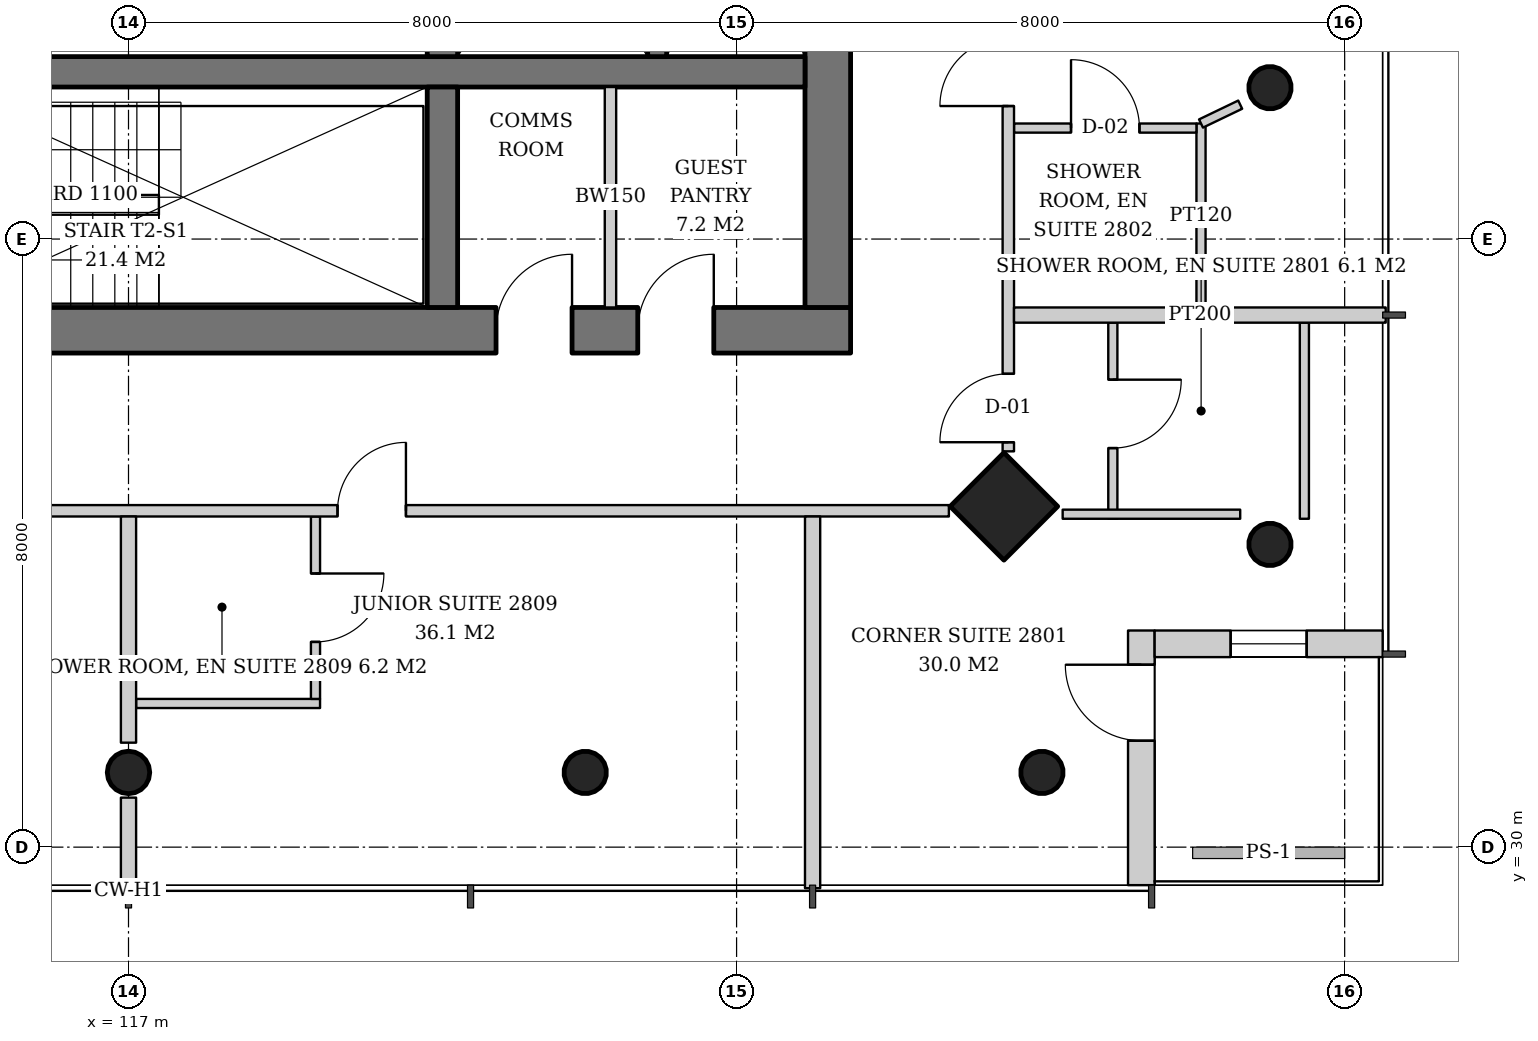
"""IFC4 building model, lengths in metres.
Left out: names, types, materials, properties, quantities, classifications, styles, units other than length and angle.
Written with IfcOpenShell. Run it as: python <this file> out.ifc"""

import sys

from ifc_helpers import new_model, si_unit, direction, frame, frame_2d, origin, origin_2d, place, context, subcontext, project, spatial, rectangle, hollow_circle, extrude, element, fill, save


model = new_model("IFC4")
c1 = context("Model", 3, precision=1e-05, world=origin(), true_north=direction((0.0, 1.0)))
c2 = subcontext(c1, "Body", "Model", "MODEL_VIEW")
j1 = project(units=[si_unit("LENGTHUNIT", "METRE"), si_unit("PLANEANGLEUNIT", "RADIAN")], contexts=[c1])
p1 = place(None, origin())
s1 = spatial("IfcSite", under=j1, at=p1, CompositionType="ELEMENT")
p2 = place(p1, origin())
s2 = spatial("IfcBuilding", under=s1, at=p2, CompositionType="ELEMENT")
p3 = place(p2, frame((0.0, 0.0, 112.2)))
s3 = spatial("IfcBuildingStorey", under=s2, at=p3, CompositionType="ELEMENT", Elevation=112.2)
p4 = place(p3, frame((132.069, 33.931, 0.0), z_axis=(-0.042965756413, 0.042965756413, 0.998152236661), x_axis=(-0.707106781187, -0.707106781187, 0.0)))
e1 = element("IfcColumn", 1, at=p4, inside=s3, PredefinedType="COLUMN", context=c2, shape_type="SweptSolid", body=[
    extrude(hollow_circle(Radius=0.28, WallThickness=0.02, at=origin_2d()), origin(), (0.0, 0.0, 1.0), 3.807),
])
p5 = place(p3, frame((132.069, 39.966, 0.0), z_axis=(-0.042995531285, 0.021497765643, 0.998843946952), x_axis=(-0.4472135955, -0.894427191, 0.0)))
e2 = element("IfcColumn", 2, at=p5, inside=s3, PredefinedType="COLUMN", context=c2, shape_type="SweptSolid", body=[
    extrude(hollow_circle(Radius=0.28, WallThickness=0.02, at=origin_2d()), origin(), (0.0, 0.0, 1.0), 3.804),
])
p6 = place(p3, frame((128.569, 34.431, 0.0), z_axis=(-0.042965756413, 0.042965756413, 0.998152236661), x_axis=(-0.707106781187, -0.707106781187, 0.0)))
e3 = element("IfcColumn", 3, at=p6, inside=s3, PredefinedType="COLUMN", context=c2, shape_type="SweptSolid", body=[
    extrude(rectangle(XDim=1.0, YDim=1.0, at=origin_2d()), origin(), (0.0, 0.0, 1.0), 3.807),
])
p7 = place(p3, frame((129.069, 30.931, 0.0), z_axis=(-0.042965756413, 0.042965756413, 0.998152236661), x_axis=(-0.707106781187, -0.707106781187, 0.0)))
e4 = element("IfcColumn", 4, at=p7, inside=s3, PredefinedType="COLUMN", context=c2, shape_type="SweptSolid", body=[
    extrude(hollow_circle(Radius=0.28, WallThickness=0.02, at=origin_2d()), origin(), (0.0, 0.0, 1.0), 3.807),
])
p8 = place(p3, frame((117.0, 30.931, 0.0), z_axis=(0.0, 0.043005470007, 0.999074836811), x_axis=(-1.0, 0.0, 0.0)))
e5 = element("IfcColumn", 5, at=p8, inside=s3, PredefinedType="COLUMN", context=c2, shape_type="SweptSolid", body=[
    extrude(hollow_circle(Radius=0.28, WallThickness=0.02, at=origin_2d()), origin(), (0.0, 0.0, 1.0), 3.803),
])
p9 = place(p3, frame((123.034, 30.931, 0.0), z_axis=(-0.021497765643, 0.042995531285, 0.998843946952), x_axis=(-0.894427191, -0.4472135955, 0.0)))
e6 = element("IfcColumn", 6, at=p9, inside=s3, PredefinedType="COLUMN", context=c2, shape_type="SweptSolid", body=[
    extrude(hollow_circle(Radius=0.28, WallThickness=0.02, at=origin_2d()), origin(), (0.0, 0.0, 1.0), 3.804),
])
p10 = place(p3, frame((107.5, 36.8, 0.0), z_axis=(0.0, 0.0, 1.0), x_axis=(1.0, 0.0, 0.0)))
e7 = element("IfcWall", 7, at=p10, inside=s3, PredefinedType="SHEAR", context=c2, shape_type="SweptSolid", body=[
    extrude(rectangle(XDim=19.0, YDim=0.6, at=frame_2d((9.5, 0.0))), origin(), (0.0, 0.0, 1.0), 3.8),
])
p11 = place(p10, frame((3.9, 0.0, 0.0)))
e8 = element("IfcOpeningElement", 8, at=p11, cuts=e7, PredefinedType="OPENING", context=c2, shape_type="SweptSolid", body=[
    extrude(rectangle(XDim=1.0, YDim=2.1, at=frame_2d((0.5, 1.05))), frame((0.0, 0.31, 0.0), z_axis=(0.0, -1.0, 0.0), x_axis=(1.0, 0.0, 0.0)), (0.0, 0.0, 1.0), 0.62),
])
p12 = place(p10, frame((14.335, 0.0, 0.0)))
e9 = element("IfcOpeningElement", 9, at=p12, cuts=e7, PredefinedType="OPENING", context=c2, shape_type="SweptSolid", body=[
    extrude(rectangle(XDim=1.0, YDim=2.1, at=frame_2d((0.5, 1.05))), frame((0.0, 0.31, 0.0), z_axis=(0.0, -1.0, 0.0), x_axis=(1.0, 0.0, 0.0)), (0.0, 0.0, 1.0), 0.62),
])
p13 = place(p10, frame((16.2, 0.0, 0.0)))
e10 = element("IfcOpeningElement", 10, at=p13, cuts=e7, PredefinedType="OPENING", context=c2, shape_type="SweptSolid", body=[
    extrude(rectangle(XDim=1.0, YDim=2.1, at=frame_2d((0.5, 1.05))), frame((0.0, 0.31, 0.0), z_axis=(0.0, -1.0, 0.0), x_axis=(1.0, 0.0, 0.0)), (0.0, 0.0, 1.0), 0.62),
])
p14 = place(p3, frame((126.2, 37.1, 0.0), z_axis=(0.0, 0.0, 1.0), x_axis=(0.0, 1.0, 0.0)))
e11 = element("IfcWall", 11, at=p14, inside=s3, PredefinedType="SHEAR", context=c2, shape_type="SweptSolid", body=[
    extrude(rectangle(XDim=17.8, YDim=0.6, at=frame_2d((8.9, 0.0))), origin(), (0.0, 0.0, 1.0), 3.8),
])
p15 = place(p14, frame((8.0, 0.0, 0.0)))
e12 = element("IfcOpeningElement", 12, at=p15, cuts=e11, PredefinedType="OPENING", context=c2, shape_type="SweptSolid", body=[
    extrude(rectangle(XDim=1.8, YDim=2.4, at=frame_2d((0.9, 1.2))), frame((0.0, 0.31, 0.0), z_axis=(0.0, -1.0, 0.0), x_axis=(1.0, 0.0, 0.0)), (0.0, 0.0, 1.0), 0.62),
])
p16 = place(p3, frame((108.1, 40.2, 0.0), z_axis=(0.0, 0.0, 1.0), x_axis=(1.0, 0.0, 0.0)))
e13 = element("IfcWall", 13, at=p16, inside=s3, PredefinedType="SHEAR", context=c2, shape_type="SweptSolid", body=[
    extrude(rectangle(XDim=17.8, YDim=0.4, at=frame_2d((8.9, 0.0))), origin(), (0.0, 0.0, 1.0), 3.8),
])
p17 = place(p3, frame((121.13, 37.1, 0.0), z_axis=(0.0, 0.0, 1.0), x_axis=(0.0, 1.0, 0.0)))
e14 = element("IfcWall", 14, at=p17, inside=s3, PredefinedType="SHEAR", context=c2, shape_type="SweptSolid", body=[
    extrude(rectangle(XDim=2.9, YDim=0.4, at=frame_2d((1.45, 0.0))), origin(), (0.0, 0.0, 1.0), 3.8),
])
p18 = place(p3, frame((121.13, 40.4, 0.0), z_axis=(0.0, 0.0, 1.0), x_axis=(0.0, 1.0, 0.0)))
e15 = element("IfcWall", 15, at=p18, inside=s3, PredefinedType="SHEAR", context=c2, shape_type="SweptSolid", body=[
    extrude(rectangle(XDim=11.2, YDim=0.4, at=frame_2d((5.6, 0.0))), origin(), (0.0, 0.0, 1.0), 3.8),
])
p19 = place(p3, frame((130.325, 29.5, 0.0), z_axis=(0.0, 0.0, 1.0), x_axis=(0.0, 1.0, 0.0)))
e16 = element("IfcWall", 16, at=p19, inside=s3, PredefinedType="SOLIDWALL", context=c2, shape_type="SweptSolid", body=[
    extrude(rectangle(XDim=3.35, YDim=0.35, at=frame_2d((1.675, 0.0))), origin(), (0.0, 0.0, 1.0), 3.6),
])
p20 = place(p19, frame((1.9, 0.0, 0.0)))
e17 = element("IfcOpeningElement", 17, at=p20, cuts=e16, PredefinedType="OPENING", context=c2, shape_type="SweptSolid", body=[
    extrude(rectangle(XDim=1.0, YDim=2.4, at=frame_2d((0.5, 1.2))), frame((0.0, 0.185, 0.0), z_axis=(0.0, -1.0, 0.0), x_axis=(1.0, 0.0, 0.0)), (0.0, 0.0, 1.0), 0.37),
])
p21 = place(p3, frame((130.5, 32.675, 0.0), z_axis=(0.0, 0.0, 1.0), x_axis=(1.0, 0.0, 0.0)))
e18 = element("IfcWall", 18, at=p21, inside=s3, PredefinedType="SOLIDWALL", context=c2, shape_type="SweptSolid", body=[
    extrude(rectangle(XDim=3.0, YDim=0.35, at=frame_2d((1.5, 0.0))), origin(), (0.0, 0.0, 1.0), 3.6),
])
p22 = place(p21, frame((1.0, 0.0, 0.9)))
e19 = element("IfcOpeningElement", 19, at=p22, cuts=e18, PredefinedType="OPENING", context=c2, shape_type="SweptSolid", body=[
    extrude(rectangle(XDim=1.0, YDim=2.4, at=frame_2d((0.5, 1.2))), frame((0.0, 0.185, 0.0), z_axis=(0.0, -1.0, 0.0), x_axis=(1.0, 0.0, 0.0)), (0.0, 0.0, 1.0), 0.37),
])
p23 = place(p3, frame((123.955, 44.25, 0.0), z_axis=(0.0, 0.0, 1.0), x_axis=(0.0, -1.0, 0.0)))
e20 = element("IfcWall", 20, at=p23, inside=s3, PredefinedType="SHEAR", context=c2, shape_type="SweptSolid", body=[
    extrude(rectangle(XDim=3.85, YDim=0.25, at=frame_2d((1.925, 0.0))), origin(), (0.0, 0.0, 1.0), 3.8),
])
p24 = place(p3, frame((123.341, 37.1, 0.0), z_axis=(0.0, 0.0, 1.0), x_axis=(0.0, 1.0, 0.0)))
e21 = element("IfcWall", 21, at=p24, inside=s3, PredefinedType="SOLIDWALL", context=c2, shape_type="SweptSolid", body=[
    extrude(rectangle(XDim=2.9, YDim=0.15, at=frame_2d((1.45, 0.0))), origin(), (0.0, 0.0, 1.0), 3.6),
])
p25 = place(p3, frame((129.95, 36.9, 0.0), z_axis=(0.0, 0.0, 1.0), x_axis=(0.0, -1.0, 0.0)))
e22 = element("IfcWall", 22, at=p25, inside=s3, PredefinedType="PARTITIONING", context=c2, shape_type="SweptSolid", body=[
    extrude(rectangle(XDim=2.58, YDim=0.12, at=frame_2d((1.29, 0.0))), origin(), (0.0, 0.0, 1.0), 2.9),
])
p26 = place(p25, frame((0.75, 0.0, 0.0)))
e23 = element("IfcOpeningElement", 23, at=p26, cuts=e22, PredefinedType="OPENING", context=c2, shape_type="SweptSolid", body=[
    extrude(rectangle(XDim=0.9, YDim=2.1, at=frame_2d((0.45, 1.05))), frame((0.0, 0.07, 0.0), z_axis=(0.0, -1.0, 0.0), x_axis=(1.0, 0.0, 0.0)), (0.0, 0.0, 1.0), 0.14),
])
p27 = place(p3, frame((132.47, 36.9, 0.0), z_axis=(0.0, 0.0, 1.0), x_axis=(0.0, -1.0, 0.0)))
e24 = element("IfcWall", 24, at=p27, inside=s3, PredefinedType="PARTITIONING", context=c2, shape_type="SweptSolid", body=[
    extrude(rectangle(XDim=2.58, YDim=0.12, at=frame_2d((1.29, 0.0))), origin(), (0.0, 0.0, 1.0), 3.6),
])
p28 = place(p3, frame((129.29, 34.38, 0.0), z_axis=(0.0, 0.0, 1.0), x_axis=(1.0, 0.0, 0.0)))
e25 = element("IfcWall", 25, at=p28, inside=s3, PredefinedType="PARTITIONING", context=c2, shape_type="SweptSolid", body=[
    extrude(rectangle(XDim=2.336, YDim=0.12, at=frame_2d((1.168, 0.0))), origin(), (0.0, 0.0, 1.0), 3.2),
])
p29 = place(p3, frame((131.11, 37.1, 0.0), z_axis=(0.0, 0.0, 1.0), x_axis=(0.0, 1.0, 0.0)))
e26 = element("IfcWall", 26, at=p29, inside=s3, PredefinedType="PARTITIONING", context=c2, shape_type="SweptSolid", body=[
    extrude(rectangle(XDim=2.42, YDim=0.12, at=frame_2d((1.21, 0.0))), origin(), (0.0, 0.0, 1.0), 3.6),
])
p30 = place(p3, frame((128.65, 39.46, 0.0), z_axis=(0.0, 0.0, 1.0), x_axis=(1.0, 0.0, 0.0)))
e27 = element("IfcWall", 27, at=p30, inside=s3, PredefinedType="PARTITIONING", context=c2, shape_type="SweptSolid", body=[
    extrude(rectangle(XDim=2.4, YDim=0.12, at=frame_2d((1.2, 0.0))), origin(), (0.0, 0.0, 1.0), 3.6),
])
p31 = place(p30, frame((0.75, 0.0, 0.0)))
e28 = element("IfcOpeningElement", 28, at=p31, cuts=e27, PredefinedType="OPENING", context=c2, shape_type="SweptSolid", body=[
    extrude(rectangle(XDim=0.9, YDim=2.1, at=frame_2d((0.45, 1.05))), frame((0.0, 0.07, 0.0), z_axis=(0.0, -1.0, 0.0), x_axis=(1.0, 0.0, 0.0)), (0.0, 0.0, 1.0), 0.14),
])
p32 = place(p3, frame((128.575, 35.207, 0.0), z_axis=(0.0, 0.0, 1.0), x_axis=(0.0, 1.0, 0.0)))
e29 = element("IfcWall", 29, at=p32, inside=s3, PredefinedType="PARTITIONING", context=c2, shape_type="SweptSolid", body=[
    extrude(rectangle(XDim=21.586, YDim=0.15, at=frame_2d((10.793, 0.0))), origin(), (0.0, 0.0, 1.0), 2.9),
])
p33 = place(p32, frame((0.12, 0.0, 0.0)))
e30 = element("IfcOpeningElement", 30, at=p33, cuts=e29, PredefinedType="OPENING", context=c2, shape_type="SweptSolid", body=[
    extrude(rectangle(XDim=0.9, YDim=2.1, at=frame_2d((0.45, 1.05))), frame((0.0, 0.085, 0.0), z_axis=(0.0, -1.0, 0.0), x_axis=(1.0, 0.0, 0.0)), (0.0, 0.0, 1.0), 0.17),
])
p34 = place(p32, frame((4.543, 0.0, 0.0)))
e31 = element("IfcOpeningElement", 31, at=p34, cuts=e29, PredefinedType="OPENING", context=c2, shape_type="SweptSolid", body=[
    extrude(rectangle(XDim=0.9, YDim=2.1, at=frame_2d((0.45, 1.05))), frame((0.0, 0.085, 0.0), z_axis=(0.0, -1.0, 0.0), x_axis=(1.0, 0.0, 0.0)), (0.0, 0.0, 1.0), 0.17),
])
p35 = place(p32, frame((13.543, 0.0, 0.0)))
e32 = element("IfcOpeningElement", 32, at=p35, cuts=e29, PredefinedType="OPENING", context=c2, shape_type="SweptSolid", body=[
    extrude(rectangle(XDim=0.9, YDim=2.1, at=frame_2d((0.45, 1.05))), frame((0.0, 0.085, 0.0), z_axis=(0.0, -1.0, 0.0), x_axis=(1.0, 0.0, 0.0)), (0.0, 0.0, 1.0), 0.17),
])
p36 = place(p3, frame((128.65, 37.0, 0.0), z_axis=(0.0, 0.0, 1.0), x_axis=(1.0, 0.0, 0.0)))
e33 = element("IfcWall", 33, at=p36, inside=s3, PredefinedType="PARTITIONING", context=c2, shape_type="SweptSolid", body=[
    extrude(rectangle(XDim=4.89, YDim=0.2, at=frame_2d((2.445, 0.0))), origin(), (0.0, 0.0, 1.0), 2.9),
])
p37 = place(p3, frame((117.1, 31.89, 0.0), z_axis=(0.0, 0.0, 1.0), x_axis=(1.0, 0.0, 0.0)))
e34 = element("IfcWall", 34, at=p37, inside=s3, PredefinedType="PARTITIONING", context=c2, shape_type="SweptSolid", body=[
    extrude(rectangle(XDim=2.42, YDim=0.12, at=frame_2d((1.21, 0.0))), origin(), (0.0, 0.0, 1.0), 3.6),
])
p38 = place(p3, frame((119.46, 34.35, 0.0), z_axis=(0.0, 0.0, 1.0), x_axis=(0.0, -1.0, 0.0)))
e35 = element("IfcWall", 35, at=p38, inside=s3, PredefinedType="PARTITIONING", context=c2, shape_type="SweptSolid", body=[
    extrude(rectangle(XDim=2.4, YDim=0.12, at=frame_2d((1.2, 0.0))), origin(), (0.0, 0.0, 1.0), 3.6),
])
p39 = place(p38, frame((0.75, 0.0, 0.0)))
e36 = element("IfcOpeningElement", 36, at=p39, cuts=e35, PredefinedType="OPENING", context=c2, shape_type="SweptSolid", body=[
    extrude(rectangle(XDim=0.9, YDim=2.1, at=frame_2d((0.45, 1.05))), frame((0.0, 0.07, 0.0), z_axis=(0.0, -1.0, 0.0), x_axis=(1.0, 0.0, 0.0)), (0.0, 0.0, 1.0), 0.14),
])
p40 = place(p3, frame((106.207, 34.425, 0.0), z_axis=(0.0, 0.0, 1.0), x_axis=(1.0, 0.0, 0.0)))
e37 = element("IfcWall", 37, at=p40, inside=s3, PredefinedType="PARTITIONING", context=c2, shape_type="SweptSolid", body=[
    extrude(rectangle(XDim=21.586, YDim=0.15, at=frame_2d((10.793, 0.0))), origin(), (0.0, 0.0, 1.0), 2.9),
])
p41 = place(p40, frame((0.12, 0.0, 0.0)))
e38 = element("IfcOpeningElement", 38, at=p41, cuts=e37, PredefinedType="OPENING", context=c2, shape_type="SweptSolid", body=[
    extrude(rectangle(XDim=0.9, YDim=2.1, at=frame_2d((0.45, 1.05))), frame((0.0, 0.085, 0.0), z_axis=(0.0, -1.0, 0.0), x_axis=(1.0, 0.0, 0.0)), (0.0, 0.0, 1.0), 0.17),
])
p42 = place(p40, frame((4.493, 0.0, 0.0)))
e39 = element("IfcOpeningElement", 39, at=p42, cuts=e37, PredefinedType="OPENING", context=c2, shape_type="SweptSolid", body=[
    extrude(rectangle(XDim=1.0, YDim=2.1, at=frame_2d((0.5, 1.05))), frame((0.0, 0.085, 0.0), z_axis=(0.0, -1.0, 0.0), x_axis=(1.0, 0.0, 0.0)), (0.0, 0.0, 1.0), 0.17),
])
p43 = place(p40, frame((13.543, 0.0, 0.0)))
e40 = element("IfcOpeningElement", 40, at=p43, cuts=e37, PredefinedType="OPENING", context=c2, shape_type="SweptSolid", body=[
    extrude(rectangle(XDim=0.9, YDim=2.1, at=frame_2d((0.45, 1.05))), frame((0.0, 0.085, 0.0), z_axis=(0.0, -1.0, 0.0), x_axis=(1.0, 0.0, 0.0)), (0.0, 0.0, 1.0), 0.17),
])
p44 = place(p3, frame((117.0, 34.35, 0.0), z_axis=(0.0, 0.0, 1.0), x_axis=(0.0, -1.0, 0.0)))
e41 = element("IfcWall", 41, at=p44, inside=s3, PredefinedType="PARTITIONING", context=c2, shape_type="SweptSolid", body=[
    extrude(rectangle(XDim=2.976, YDim=0.2, at=frame_2d((1.488, 0.0))), origin(), (0.0, 0.0, 1.0), 3.6),
])
p45 = place(p3, frame((117.0, 30.652, 0.0), z_axis=(0.0, 0.0, 1.0), x_axis=(0.0, -1.0, 0.0)))
e42 = element("IfcWall", 42, at=p45, inside=s3, PredefinedType="PARTITIONING", context=c2, shape_type="SweptSolid", body=[
    extrude(rectangle(XDim=1.192, YDim=0.2, at=frame_2d((0.596, 0.0))), origin(), (0.0, 0.0, 1.0), 3.6),
])
p46 = place(p3, frame((126.0, 34.35, 0.0), z_axis=(0.0, 0.0, 1.0), x_axis=(0.0, -1.0, 0.0)))
e43 = element("IfcWall", 43, at=p46, inside=s3, PredefinedType="PARTITIONING", context=c2, shape_type="SweptSolid", body=[
    extrude(rectangle(XDim=4.89, YDim=0.2, at=frame_2d((2.445, 0.0))), origin(), (0.0, 0.0, 1.0), 3.2),
])
p47 = place(p3, frame((131.11, 39.52, 0.0), z_axis=(0.0, 0.0, 1.0), x_axis=(0.901316511947, 0.433161107778, 0.0)))
e44 = element("IfcWall", 44, at=p47, inside=s3, PredefinedType="PARTITIONING", context=c2, shape_type="SweptSolid", body=[
    extrude(rectangle(XDim=0.572, YDim=0.12, at=frame_2d((0.286, 0.0))), origin(), (0.0, 0.0, 1.0), 3.6),
])
p48 = place(p20, origin())
e45 = element("IfcDoor", 45, at=p48, inside=s3, OperationType="SINGLE_SWING_RIGHT", PredefinedType="DOOR", context=c2, shape_type="SweptSolid", body=[
    extrude(rectangle(XDim=1.0, YDim=2.4, at=frame_2d((0.5, 1.2))), frame((0.0, 0.025, 0.0), z_axis=(0.0, -1.0, 0.0), x_axis=(1.0, 0.0, 0.0)), (0.0, 0.0, 1.0), 0.05),
])
fill(e17, e45)
p49 = place(p22, origin())
e46 = element("IfcWindow", 46, at=p49, inside=s3, PartitioningType="SINGLE_PANEL", PredefinedType="WINDOW", context=c2, shape_type="SweptSolid", body=[
    extrude(rectangle(XDim=1.0, YDim=2.4, at=frame_2d((0.5, 1.2))), frame((0.0, 0.03, 0.0), z_axis=(0.0, -1.0, 0.0), x_axis=(1.0, 0.0, 0.0)), (0.0, 0.0, 1.0), 0.06),
])
fill(e19, e46)
p50 = place(p12, origin())
e47 = element("IfcDoor", 47, at=p50, inside=s3, OperationType="SINGLE_SWING_RIGHT", PredefinedType="DOOR", context=c2, shape_type="SweptSolid", body=[
    extrude(rectangle(XDim=1.0, YDim=2.1, at=frame_2d((0.5, 1.05))), frame((0.0, 0.29, 0.0), z_axis=(0.0, -1.0, 0.0), x_axis=(1.0, 0.0, 0.0)), (0.0, 0.0, 1.0), 0.05),
])
fill(e9, e47)
p51 = place(p13, origin())
e48 = element("IfcDoor", 48, at=p51, inside=s3, OperationType="SINGLE_SWING_RIGHT", PredefinedType="DOOR", context=c2, shape_type="SweptSolid", body=[
    extrude(rectangle(XDim=1.0, YDim=2.1, at=frame_2d((0.5, 1.05))), frame((0.0, 0.29, 0.0), z_axis=(0.0, -1.0, 0.0), x_axis=(1.0, 0.0, 0.0)), (0.0, 0.0, 1.0), 0.05),
])
fill(e10, e48)
p52 = place(p26, origin())
e49 = element("IfcDoor", 49, at=p52, inside=s3, OperationType="SINGLE_SWING_LEFT", PredefinedType="DOOR", context=c2, shape_type="SweptSolid", body=[
    extrude(rectangle(XDim=0.9, YDim=2.1, at=frame_2d((0.45, 1.05))), frame((0.0, 0.025, 0.0), z_axis=(0.0, -1.0, 0.0), x_axis=(1.0, 0.0, 0.0)), (0.0, 0.0, 1.0), 0.05),
])
fill(e23, e49)
p53 = place(p31, origin())
e50 = element("IfcDoor", 50, at=p53, inside=s3, OperationType="SINGLE_SWING_LEFT", PredefinedType="DOOR", context=c2, shape_type="SweptSolid", body=[
    extrude(rectangle(XDim=0.9, YDim=2.1, at=frame_2d((0.45, 1.05))), frame((0.0, 0.025, 0.0), z_axis=(0.0, -1.0, 0.0), x_axis=(1.0, 0.0, 0.0)), (0.0, 0.0, 1.0), 0.05),
])
fill(e28, e50)
p54 = place(p33, origin())
e51 = element("IfcDoor", 51, at=p54, inside=s3, OperationType="SINGLE_SWING_LEFT", PredefinedType="DOOR", context=c2, shape_type="SweptSolid", body=[
    extrude(rectangle(XDim=0.9, YDim=2.1, at=frame_2d((0.45, 1.05))), frame((0.0, 0.025, 0.0), z_axis=(0.0, -1.0, 0.0), x_axis=(1.0, 0.0, 0.0)), (0.0, 0.0, 1.0), 0.05),
])
fill(e30, e51)
p55 = place(p34, origin())
e52 = element("IfcDoor", 52, at=p55, inside=s3, OperationType="SINGLE_SWING_LEFT", PredefinedType="DOOR", context=c2, shape_type="SweptSolid", body=[
    extrude(rectangle(XDim=0.9, YDim=2.1, at=frame_2d((0.45, 1.05))), frame((0.0, 0.025, 0.0), z_axis=(0.0, -1.0, 0.0), x_axis=(1.0, 0.0, 0.0)), (0.0, 0.0, 1.0), 0.05),
])
fill(e31, e52)
p56 = place(p39, origin())
e53 = element("IfcDoor", 53, at=p56, inside=s3, OperationType="SINGLE_SWING_LEFT", PredefinedType="DOOR", context=c2, shape_type="SweptSolid", body=[
    extrude(rectangle(XDim=0.9, YDim=2.1, at=frame_2d((0.45, 1.05))), frame((0.0, 0.025, 0.0), z_axis=(0.0, -1.0, 0.0), x_axis=(1.0, 0.0, 0.0)), (0.0, 0.0, 1.0), 0.05),
])
fill(e36, e53)
p57 = place(p43, origin())
e54 = element("IfcDoor", 54, at=p57, inside=s3, OperationType="SINGLE_SWING_RIGHT", PredefinedType="DOOR", context=c2, shape_type="SweptSolid", body=[
    extrude(rectangle(XDim=0.9, YDim=2.1, at=frame_2d((0.45, 1.05))), frame((0.0, 0.025, 0.0), z_axis=(0.0, -1.0, 0.0), x_axis=(1.0, 0.0, 0.0)), (0.0, 0.0, 1.0), 0.05),
])
fill(e40, e54)
save(model, sys.argv[1])
